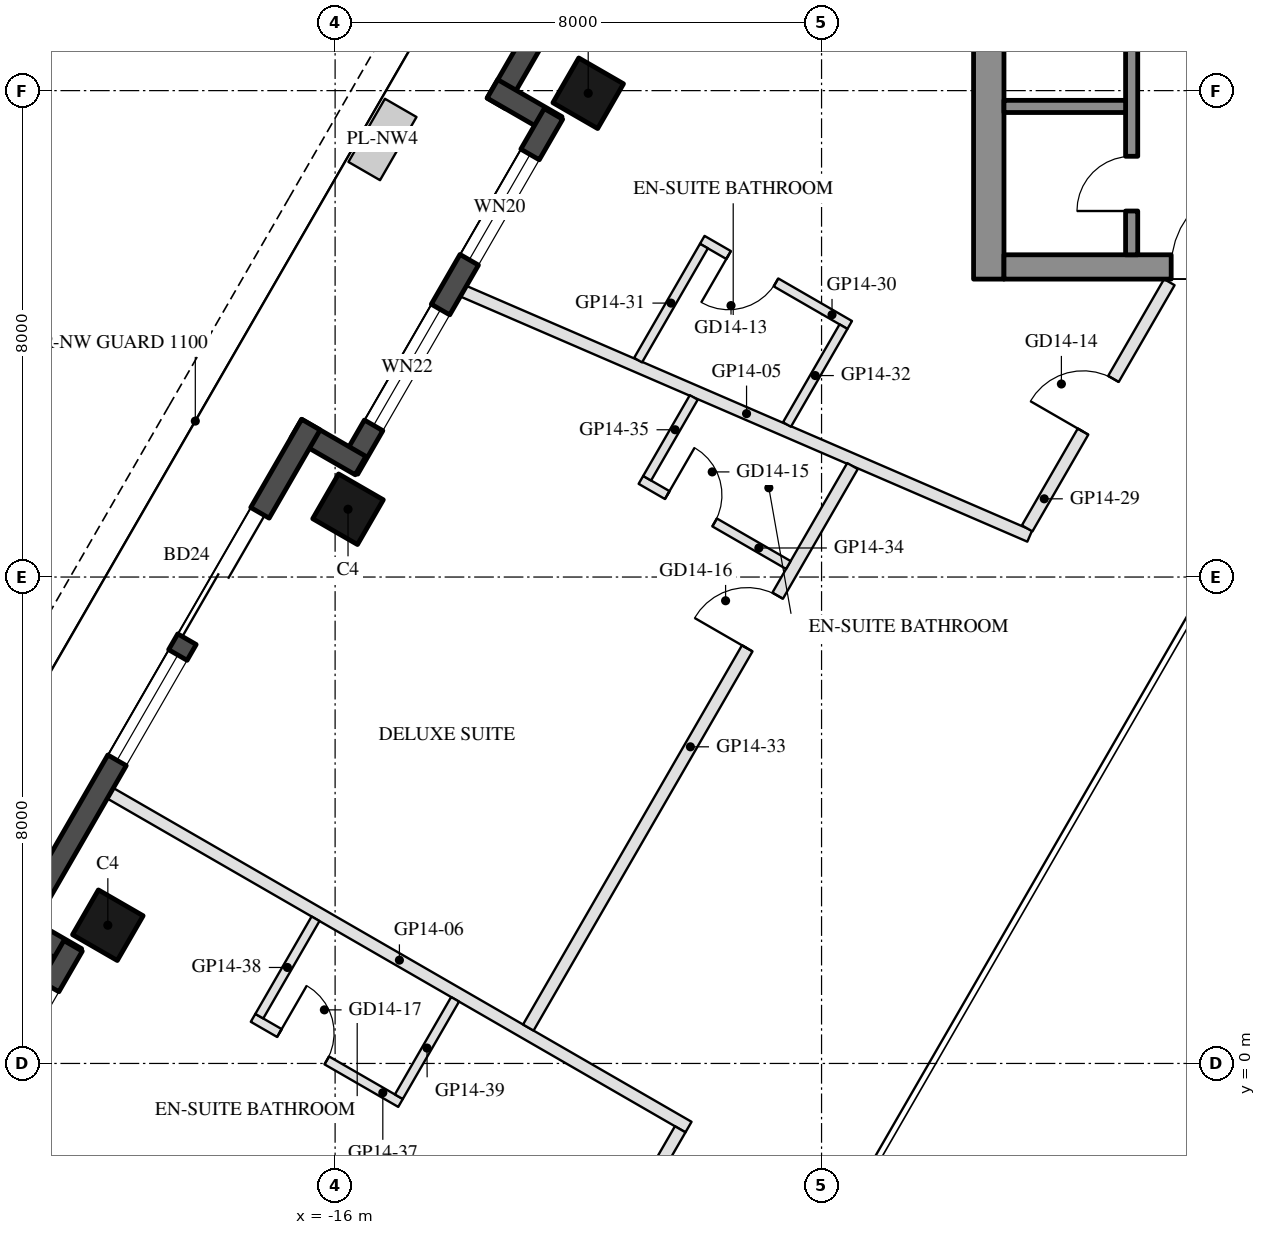
"""IFC4 building model, lengths in metres.
Left out: names, types, materials, properties, quantities, classifications, styles, units other than length and angle.
Written with IfcOpenShell. Run it as: python <this file> out.ifc"""

import sys

from ifc_helpers import new_model, si_unit, direction, frame, frame_2d, origin, origin_2d, place, context, subcontext, project, spatial, rectangle, hollow_rectangle, extrude, element, fill, save


model = new_model("IFC4")
c1 = context("Model", 3, precision=1e-05, world=origin(), true_north=direction((0.0, 1.0)))
c2 = subcontext(c1, "Body", "Model", "MODEL_VIEW")
j1 = project(units=[si_unit("LENGTHUNIT", "METRE"), si_unit("PLANEANGLEUNIT", "RADIAN")], contexts=[c1])
p1 = place(None, origin())
s1 = spatial("IfcSite", under=j1, at=p1, CompositionType="ELEMENT")
p2 = place(p1, origin())
s2 = spatial("IfcBuilding", under=s1, at=p2, CompositionType="ELEMENT")
p3 = place(p2, frame((0.0, 0.0, 161.4)))
s3 = spatial("IfcBuildingStorey", under=s2, at=p3, CompositionType="ELEMENT", Elevation=161.4)
for number, where, z_axis, x_axis in (
    (1, (-11.838, 15.957, 0.0), (0.0, 0.0, 1.0), (0.5, 0.866, 0.0)),
    (2, (-15.788, 9.115, 0.0), (0.0, 0.0, 1.0), (0.5, 0.866, 0.0)),
    (3, (-19.738, 2.273, 0.0), (0.0, 0.0, 1.0), (0.5, 0.866, 0.0)),
):
    element("IfcColumn", number, at=place(p3, frame(where, z_axis=z_axis, x_axis=x_axis)), inside=s3, PredefinedType="COLUMN", context=c2, shape_type="SweptSolid", body=[
        extrude(hollow_rectangle(XDim=0.85, YDim=0.85, WallThickness=0.04, at=origin_2d()), origin(), (0.0, 0.0, 1.0), 3.7),
    ])
p4 = place(p3, frame((-7.441, 26.022, 0.0), z_axis=(0.0, 0.0, 1.0), x_axis=(-0.499992533062, -0.86602971478, 0.0)))
e4 = element("IfcWall", 4, at=p4, inside=s3, PredefinedType="SOLIDWALL", context=c2, shape_type="SweptSolid", body=[
    extrude(rectangle(XDim=11.816, YDim=0.35, at=frame_2d((5.908, 0.0))), origin(), (0.0, 0.0, 1.0), 3.55),
])
p5 = place(p4, frame((0.381, 0.0, 0.3)))
e5 = element("IfcOpeningElement", 5, at=p5, cuts=e4, PredefinedType="OPENING", context=c2, shape_type="SweptSolid", body=[
    extrude(rectangle(XDim=1.8, YDim=2.65, at=frame_2d((0.9, 1.325))), frame((0.0, 0.185, 0.0), z_axis=(0.0, -1.0, 0.0), x_axis=(1.0, 0.0, 0.0)), (0.0, 0.0, 1.0), 0.37),
])
p6 = place(p4, frame((7.74, 0.0, 0.0)))
e6 = element("IfcOpeningElement", 6, at=p6, cuts=e4, PredefinedType="OPENING", context=c2, shape_type="SweptSolid", body=[
    extrude(rectangle(XDim=2.4, YDim=2.4, at=frame_2d((1.2, 1.2))), frame((0.0, 0.185, 0.0), z_axis=(0.0, -1.0, 0.0), x_axis=(1.0, 0.0, 0.0)), (0.0, 0.0, 1.0), 0.37),
])
p7 = place(p4, frame((3.791, 0.0, 0.3)))
e7 = element("IfcOpeningElement", 7, at=p7, cuts=e4, PredefinedType="OPENING", context=c2, shape_type="SweptSolid", body=[
    extrude(rectangle(XDim=1.6, YDim=2.65, at=frame_2d((0.8, 1.325))), frame((0.0, 0.185, 0.0), z_axis=(0.0, -1.0, 0.0), x_axis=(1.0, 0.0, 0.0)), (0.0, 0.0, 1.0), 0.37),
])
p8 = place(p4, frame((5.691, 0.0, 0.3)))
e8 = element("IfcOpeningElement", 8, at=p8, cuts=e4, PredefinedType="OPENING", context=c2, shape_type="SweptSolid", body=[
    extrude(rectangle(XDim=1.6, YDim=2.65, at=frame_2d((0.8, 1.325))), frame((0.0, 0.185, 0.0), z_axis=(0.0, -1.0, 0.0), x_axis=(1.0, 0.0, 0.0)), (0.0, 0.0, 1.0), 0.37),
])
p9 = place(p3, frame((-13.413, 16.029, 0.0), z_axis=(0.0, 0.0, 1.0), x_axis=(0.866005645448, -0.500034220881, 0.0)))
e9 = element("IfcWall", 9, at=p9, inside=s3, PredefinedType="SOLIDWALL", context=c2, shape_type="SweptSolid", body=[
    extrude(rectangle(XDim=1.22, YDim=0.35, at=frame_2d((0.61, 0.0))), origin(), (0.0, 0.0, 1.0), 3.55),
])
p10 = place(p3, frame((-12.409, 15.617, 0.0), z_axis=(0.0, 0.0, 1.0), x_axis=(-0.500003597184, -0.866023326939, 0.0)))
e10 = element("IfcWall", 10, at=p10, inside=s3, PredefinedType="SOLIDWALL", context=c2, shape_type="SweptSolid", body=[
    extrude(rectangle(XDim=6.74, YDim=0.35, at=frame_2d((3.37, 0.0))), origin(), (0.0, 0.0, 1.0), 3.55),
])
p11 = place(p10, frame((0.77, 0.0, 0.3)))
e11 = element("IfcOpeningElement", 11, at=p11, cuts=e10, PredefinedType="OPENING", context=c2, shape_type="SweptSolid", body=[
    extrude(rectangle(XDim=2.0, YDim=2.65, at=frame_2d((1.0, 1.325))), frame((0.0, 0.185, 0.0), z_axis=(0.0, -1.0, 0.0), x_axis=(1.0, 0.0, 0.0)), (0.0, 0.0, 1.0), 0.37),
])
p12 = place(p10, frame((3.715, 0.0, 0.3)))
e12 = element("IfcOpeningElement", 12, at=p12, cuts=e10, PredefinedType="OPENING", context=c2, shape_type="SweptSolid", body=[
    extrude(rectangle(XDim=2.2, YDim=2.65, at=frame_2d((1.1, 1.325))), frame((0.0, 0.185, 0.0), z_axis=(0.0, -1.0, 0.0), x_axis=(1.0, 0.0, 0.0)), (0.0, 0.0, 1.0), 0.37),
])
p13 = place(p3, frame((-15.581, 9.833, 0.0), z_axis=(0.0, 0.0, 1.0), x_axis=(-0.866055662726, 0.499947586314, 0.0)))
e13 = element("IfcWall", 13, at=p13, inside=s3, PredefinedType="SOLIDWALL", context=c2, shape_type="SweptSolid", body=[
    extrude(rectangle(XDim=1.22, YDim=0.35, at=frame_2d((0.61, 0.0))), origin(), (0.0, 0.0, 1.0), 3.55),
])
p14 = place(p3, frame((-16.398, 10.507, 0.0), z_axis=(0.0, 0.0, 1.0), x_axis=(-0.499999142773, -0.866025898704, 0.0)))
e14 = element("IfcWall", 14, at=p14, inside=s3, PredefinedType="SOLIDWALL", context=c2, shape_type="SweptSolid", body=[
    extrude(rectangle(XDim=9.7, YDim=0.35, at=frame_2d((4.85, 0.0))), origin(), (0.0, 0.0, 1.0), 3.55),
])
p15 = place(p14, frame((1.675, 0.0, 0.0)))
e15 = element("IfcOpeningElement", 15, at=p15, cuts=e14, PredefinedType="OPENING", context=c2, shape_type="SweptSolid", body=[
    extrude(rectangle(XDim=2.4, YDim=2.4, at=frame_2d((1.2, 1.2))), frame((0.0, 0.185, 0.0), z_axis=(0.0, -1.0, 0.0), x_axis=(1.0, 0.0, 0.0)), (0.0, 0.0, 1.0), 0.37),
])
p16 = place(p14, frame((4.375, 0.0, 0.3)))
e16 = element("IfcOpeningElement", 16, at=p16, cuts=e14, PredefinedType="OPENING", context=c2, shape_type="SweptSolid", body=[
    extrude(rectangle(XDim=2.0, YDim=2.65, at=frame_2d((1.0, 1.325))), frame((0.0, 0.185, 0.0), z_axis=(0.0, -1.0, 0.0), x_axis=(1.0, 0.0, 0.0)), (0.0, 0.0, 1.0), 0.37),
])
p17 = place(p3, frame((-21.312, 2.346, 0.0), z_axis=(0.0, 0.0, 1.0), x_axis=(0.866005645448, -0.500034220881, 0.0)))
e17 = element("IfcWall", 17, at=p17, inside=s3, PredefinedType="SOLIDWALL", context=c2, shape_type="SweptSolid", body=[
    extrude(rectangle(XDim=1.22, YDim=0.35, at=frame_2d((0.61, 0.0))), origin(), (0.0, 0.0, 1.0), 3.55),
])
p18 = place(p3, frame((-20.309, 1.934, 0.0), z_axis=(0.0, 0.0, 1.0), x_axis=(-0.499992114976, -0.866029956157, 0.0)))
e18 = element("IfcWall", 18, at=p18, inside=s3, PredefinedType="SOLIDWALL", context=c2, shape_type="SweptSolid", body=[
    extrude(rectangle(XDim=6.74, YDim=0.35, at=frame_2d((3.37, 0.0))), origin(), (0.0, 0.0, 1.0), 3.55),
])
p19 = place(p18, frame((4.02, 0.0, 0.0)))
e19 = element("IfcOpeningElement", 19, at=p19, cuts=e18, PredefinedType="OPENING", context=c2, shape_type="SweptSolid", body=[
    extrude(rectangle(XDim=2.4, YDim=2.4, at=frame_2d((1.2, 1.2))), frame((0.0, 0.185, 0.0), z_axis=(0.0, -1.0, 0.0), x_axis=(1.0, 0.0, 0.0)), (0.0, 0.0, 1.0), 0.37),
])
p20 = place(p18, frame((0.77, 0.0, 0.3)))
e20 = element("IfcOpeningElement", 20, at=p20, cuts=e18, PredefinedType="OPENING", context=c2, shape_type="SweptSolid", body=[
    extrude(rectangle(XDim=2.9, YDim=2.65, at=frame_2d((1.45, 1.325))), frame((0.0, 0.185, 0.0), z_axis=(0.0, -1.0, 0.0), x_axis=(1.0, 0.0, 0.0)), (0.0, 0.0, 1.0), 0.37),
])
p21 = place(p3, frame((-5.25, 12.9, 0.0), z_axis=(0.0, 0.0, 1.0), x_axis=(0.0, 1.0, 0.0)))
e21 = element("IfcWall", 21, at=p21, inside=s3, PredefinedType="SHEAR", context=c2, shape_type="SweptSolid", body=[
    extrude(rectangle(XDim=14.837, YDim=0.5, at=frame_2d((7.418, 0.0))), origin(), (0.0, 0.0, 1.0), 3.5),
])
p22 = place(p3, frame((5.0, 13.1, 0.0), z_axis=(0.0, 0.0, 1.0), x_axis=(-1.0, 0.0, 0.0)))
e22 = element("IfcWall", 22, at=p22, inside=s3, PredefinedType="SHEAR", context=c2, shape_type="SweptSolid", body=[
    extrude(rectangle(XDim=10.0, YDim=0.4, at=frame_2d((5.0, 0.0))), origin(), (0.0, 0.0, 1.0), 3.5),
])
p23 = place(p22, frame((3.55, 0.0, 0.0)))
e23 = element("IfcOpeningElement", 23, at=p23, cuts=e22, PredefinedType="OPENING", context=c2, shape_type="SweptSolid", body=[
    extrude(rectangle(XDim=1.1, YDim=2.1, at=frame_2d((0.55, 1.05))), frame((0.0, 0.21, 0.0), z_axis=(0.0, -1.0, 0.0), x_axis=(1.0, 0.0, 0.0)), (0.0, 0.0, 1.0), 0.42),
])
p24 = place(p22, frame((5.85, 0.0, 0.0)))
e24 = element("IfcOpeningElement", 24, at=p24, cuts=e22, PredefinedType="OPENING", context=c2, shape_type="SweptSolid", body=[
    extrude(rectangle(XDim=1.4, YDim=2.1, at=frame_2d((0.7, 1.05))), frame((0.0, 0.21, 0.0), z_axis=(0.0, -1.0, 0.0), x_axis=(1.0, 0.0, 0.0)), (0.0, 0.0, 1.0), 0.42),
])
p25 = place(p3, frame((-2.9, 13.3, 0.0), z_axis=(0.0, 0.0, 1.0), x_axis=(0.0, 1.0, 0.0)))
e25 = element("IfcWall", 25, at=p25, inside=s3, PredefinedType="SHEAR", context=c2, shape_type="SweptSolid", body=[
    extrude(rectangle(XDim=12.6, YDim=0.2, at=frame_2d((6.3, 0.0))), origin(), (0.0, 0.0, 1.0), 3.5),
])
p26 = place(p25, frame((0.72, 0.0, 0.0)))
e26 = element("IfcOpeningElement", 26, at=p26, cuts=e25, PredefinedType="OPENING", context=c2, shape_type="SweptSolid", body=[
    extrude(rectangle(XDim=0.9, YDim=2.1, at=frame_2d((0.45, 1.05))), frame((0.0, 0.11, 0.0), z_axis=(0.0, -1.0, 0.0), x_axis=(1.0, 0.0, 0.0)), (0.0, 0.0, 1.0), 0.22),
])
p27 = place(p25, frame((5.8, 0.0, 0.0)))
e27 = element("IfcOpeningElement", 27, at=p27, cuts=e25, PredefinedType="OPENING", context=c2, shape_type="SweptSolid", body=[
    extrude(rectangle(XDim=0.9, YDim=2.1, at=frame_2d((0.45, 1.05))), frame((0.0, 0.11, 0.0), z_axis=(0.0, -1.0, 0.0), x_axis=(1.0, 0.0, 0.0)), (0.0, 0.0, 1.0), 0.22),
])
p28 = place(p25, frame((10.51, 0.0, 0.0)))
e28 = element("IfcOpeningElement", 28, at=p28, cuts=e25, PredefinedType="OPENING", context=c2, shape_type="SweptSolid", body=[
    extrude(rectangle(XDim=0.9, YDim=2.1, at=frame_2d((0.45, 1.05))), frame((0.0, 0.11, 0.0), z_axis=(0.0, -1.0, 0.0), x_axis=(1.0, 0.0, 0.0)), (0.0, 0.0, 1.0), 0.22),
])
p29 = place(p3, frame((-3.0, 15.74, 0.0), z_axis=(0.0, 0.0, 1.0), x_axis=(-1.0, 0.0, 0.0)))
e29 = element("IfcWall", 29, at=p29, inside=s3, PredefinedType="SHEAR", context=c2, shape_type="SweptSolid", body=[
    extrude(rectangle(XDim=2.0, YDim=0.2, at=frame_2d((1.0, 0.0))), origin(), (0.0, 0.0, 1.0), 3.5),
])
p30 = place(p3, frame((-13.89, 12.701, 0.0), z_axis=(0.0, 0.0, 1.0), x_axis=(0.917850876745, -0.396925393566, 0.0)))
e30 = element("IfcWall", 30, at=p30, inside=s3, PredefinedType="PARTITIONING", context=c2, shape_type="SweptSolid", body=[
    extrude(rectangle(XDim=10.147, YDim=0.2, at=frame_2d((5.074, 0.0))), origin(), (0.0, 0.0, 1.0), 2.95),
])
p31 = place(p3, frame((-19.697, 4.444, 0.0), z_axis=(0.0, 0.0, 1.0), x_axis=(0.866027479907, -0.499996404033, 0.0)))
e31 = element("IfcWall", 31, at=p31, inside=s3, PredefinedType="PARTITIONING", context=c2, shape_type="SweptSolid", body=[
    extrude(rectangle(XDim=10.98, YDim=0.2, at=frame_2d((5.49, 0.0))), origin(), (0.0, 0.0, 1.0), 3.06),
])
p32 = place(p3, frame((-4.618, 8.801, 0.0), z_axis=(0.0, 0.0, 1.0), x_axis=(0.499980071345, 0.866036909293, 0.0)))
e32 = element("IfcWall", 32, at=p32, inside=s3, PredefinedType="PARTITIONING", context=c2, shape_type="SweptSolid", body=[
    extrude(rectangle(XDim=4.676, YDim=0.2, at=frame_2d((2.338, 0.0))), origin(), (0.0, 0.0, 1.0), 2.95),
])
p33 = place(p32, frame((1.838, 0.0, 0.0)))
e33 = element("IfcOpeningElement", 33, at=p33, cuts=e32, PredefinedType="OPENING", context=c2, shape_type="SweptSolid", body=[
    extrude(rectangle(XDim=1.0, YDim=2.1, at=frame_2d((0.5, 1.05))), frame((0.0, 0.11, 0.0), z_axis=(0.0, -1.0, 0.0), x_axis=(1.0, 0.0, 0.0)), (0.0, 0.0, 1.0), 0.22),
])
p34 = place(p3, frame((-7.537, 12.146, 0.0), z_axis=(0.0, 0.0, 1.0), x_axis=(-0.866034573852, 0.49998411664, 0.0)))
e34 = element("IfcWall", 34, at=p34, inside=s3, PredefinedType="PARTITIONING", context=c2, shape_type="SweptSolid", body=[
    extrude(rectangle(XDim=2.8, YDim=0.15, at=frame_2d((1.4, 0.0))), origin(), (0.0, 0.0, 1.0), 3.55),
])
p35 = place(p34, frame((1.4, 0.0, 0.0)))
e35 = element("IfcOpeningElement", 35, at=p35, cuts=e34, PredefinedType="OPENING", context=c2, shape_type="SweptSolid", body=[
    extrude(rectangle(XDim=0.9, YDim=2.1, at=frame_2d((0.45, 1.05))), frame((0.0, 0.085, 0.0), z_axis=(0.0, -1.0, 0.0), x_axis=(1.0, 0.0, 0.0)), (0.0, 0.0, 1.0), 0.17),
])
p36 = place(p3, frame((-9.934, 13.443, 0.0), z_axis=(0.0, 0.0, 1.0), x_axis=(-0.500018419339, -0.866014769113, 0.0)))
e36 = element("IfcWall", 36, at=p36, inside=s3, PredefinedType="PARTITIONING", context=c2, shape_type="SweptSolid", body=[
    extrude(rectangle(XDim=2.166, YDim=0.15, at=frame_2d((1.083, 0.0))), origin(), (0.0, 0.0, 1.0), 3.55),
])
p37 = place(p3, frame((-7.639, 12.118, 0.0), z_axis=(0.0, 0.0, 1.0), x_axis=(-0.500052179009, -0.865995276124, 0.0)))
e37 = element("IfcWall", 37, at=p37, inside=s3, PredefinedType="PARTITIONING", context=c2, shape_type="SweptSolid", body=[
    extrude(rectangle(XDim=1.859, YDim=0.15, at=frame_2d((0.929, 0.0))), origin(), (0.0, 0.0, 1.0), 3.55),
])
p38 = place(p3, frame((-12.823, 0.591, 0.0), z_axis=(0.0, 0.0, 1.0), x_axis=(0.500005210312, 0.866022395588, 0.0)))
e38 = element("IfcWall", 38, at=p38, inside=s3, PredefinedType="PARTITIONING", context=c2, shape_type="SweptSolid", body=[
    extrude(rectangle(XDim=10.663, YDim=0.2, at=frame_2d((5.332, 0.0))), origin(), (0.0, 0.0, 1.0), 2.95),
])
p39 = place(p38, frame((7.201, 0.0, 0.0)))
e39 = element("IfcOpeningElement", 39, at=p39, cuts=e38, PredefinedType="OPENING", context=c2, shape_type="SweptSolid", body=[
    extrude(rectangle(XDim=1.0, YDim=2.1, at=frame_2d((0.5, 1.05))), frame((0.0, 0.11, 0.0), z_axis=(0.0, -1.0, 0.0), x_axis=(1.0, 0.0, 0.0)), (0.0, 0.0, 1.0), 0.22),
])
p40 = place(p3, frame((-10.971, 9.598, 0.0), z_axis=(0.0, 0.0, 1.0), x_axis=(0.865996816683, -0.500049511043, 0.0)))
e40 = element("IfcWall", 40, at=p40, inside=s3, PredefinedType="PARTITIONING", context=c2, shape_type="SweptSolid", body=[
    extrude(rectangle(XDim=2.8, YDim=0.15, at=frame_2d((1.4, 0.0))), origin(), (0.0, 0.0, 1.0), 3.55),
])
p41 = place(p40, frame((0.5, 0.0, 0.0)))
e41 = element("IfcOpeningElement", 41, at=p41, cuts=e40, PredefinedType="OPENING", context=c2, shape_type="SweptSolid", body=[
    extrude(rectangle(XDim=0.9, YDim=2.1, at=frame_2d((0.45, 1.05))), frame((0.0, 0.085, 0.0), z_axis=(0.0, -1.0, 0.0), x_axis=(1.0, 0.0, 0.0)), (0.0, 0.0, 1.0), 0.17),
])
p42 = place(p3, frame((-10.102, 10.954, 0.0), z_axis=(0.0, 0.0, 1.0), x_axis=(-0.499956687145, -0.866050409029, 0.0)))
e42 = element("IfcWall", 42, at=p42, inside=s3, PredefinedType="PARTITIONING", context=c2, shape_type="SweptSolid", body=[
    extrude(rectangle(XDim=1.534, YDim=0.15, at=frame_2d((0.767, 0.0))), origin(), (0.0, 0.0, 1.0), 2.95),
])
p43 = place(p3, frame((-12.269, -4.45, 0.0), z_axis=(0.0, 0.0, 1.0), x_axis=(0.500008716408, 0.866020371305, 0.0)))
e43 = element("IfcWall", 43, at=p43, inside=s3, PredefinedType="PARTITIONING", context=c2, shape_type="SweptSolid", body=[
    extrude(rectangle(XDim=3.888, YDim=0.2, at=frame_2d((1.944, 0.0))), origin(), (0.0, 0.0, 1.0), 2.95),
])
p44 = place(p43, frame((1.444, 0.0, 0.0)))
e44 = element("IfcOpeningElement", 44, at=p44, cuts=e43, PredefinedType="OPENING", context=c2, shape_type="SweptSolid", body=[
    extrude(rectangle(XDim=1.0, YDim=2.1, at=frame_2d((0.5, 1.05))), frame((0.0, 0.11, 0.0), z_axis=(0.0, -1.0, 0.0), x_axis=(1.0, 0.0, 0.0)), (0.0, 0.0, 1.0), 0.22),
])
p45 = place(p3, frame((-17.349, 0.75, 0.0), z_axis=(0.0, 0.0, 1.0), x_axis=(0.866056369097, -0.49994636267, 0.0)))
e45 = element("IfcWall", 45, at=p45, inside=s3, PredefinedType="PARTITIONING", context=c2, shape_type="SweptSolid", body=[
    extrude(rectangle(XDim=2.8, YDim=0.15, at=frame_2d((1.4, 0.0))), origin(), (0.0, 0.0, 1.0), 2.95),
])
p46 = place(p45, frame((0.5, 0.0, 0.0)))
e46 = element("IfcOpeningElement", 46, at=p46, cuts=e45, PredefinedType="OPENING", context=c2, shape_type="SweptSolid", body=[
    extrude(rectangle(XDim=0.9, YDim=2.1, at=frame_2d((0.45, 1.05))), frame((0.0, 0.085, 0.0), z_axis=(0.0, -1.0, 0.0), x_axis=(1.0, 0.0, 0.0)), (0.0, 0.0, 1.0), 0.17),
])
for number, where, z_axis, x_axis in (
    (47, (-16.322, 2.38, 0.0), (0.0, 0.0, 1.0), (-0.5, -0.866, 0.0)),
    (48, (-14.027, 1.055, 0.0), (0.0, 0.0, 1.0), (-0.5, -0.866, 0.0)),
):
    element("IfcWall", number, at=place(p3, frame(where, z_axis=z_axis, x_axis=x_axis)), inside=s3, PredefinedType="PARTITIONING", context=c2, shape_type="SweptSolid", body=[
        extrude(rectangle(XDim=1.85, YDim=0.15, at=frame_2d((0.925, 0.0))), origin(), (0.0, 0.0, 1.0), 2.95),
    ])
p47 = place(p11, origin())
e49 = element("IfcWindow", 49, at=p47, inside=s3, PartitioningType="SINGLE_PANEL", PredefinedType="WINDOW", context=c2, shape_type="SweptSolid", body=[
    extrude(rectangle(XDim=2.0, YDim=2.65, at=frame_2d((1.0, 1.325))), frame((0.0, 0.03, 0.0), z_axis=(0.0, -1.0, 0.0), x_axis=(1.0, 0.0, 0.0)), (0.0, 0.0, 1.0), 0.06),
])
fill(e11, e49)
p48 = place(p12, origin())
e50 = element("IfcWindow", 50, at=p48, inside=s3, PartitioningType="SINGLE_PANEL", PredefinedType="WINDOW", context=c2, shape_type="SweptSolid", body=[
    extrude(rectangle(XDim=2.2, YDim=2.65, at=frame_2d((1.1, 1.325))), frame((0.0, 0.03, 0.0), z_axis=(0.0, -1.0, 0.0), x_axis=(1.0, 0.0, 0.0)), (0.0, 0.0, 1.0), 0.06),
])
fill(e12, e50)
p49 = place(p15, frame((2.4, 0.0, 0.0), z_axis=(0.0, 0.0, 1.0), x_axis=(-1.0, 0.0, 0.0)))
e51 = element("IfcDoor", 51, at=p49, inside=s3, OperationType="SLIDING_TO_LEFT", PredefinedType="DOOR", context=c2, shape_type="SweptSolid", body=[
    extrude(rectangle(XDim=2.4, YDim=2.4, at=frame_2d((1.2, 1.2))), frame((0.0, 0.025, 0.0), z_axis=(0.0, -1.0, 0.0), x_axis=(1.0, 0.0, 0.0)), (0.0, 0.0, 1.0), 0.05),
])
fill(e15, e51)
p50 = place(p16, origin())
e52 = element("IfcWindow", 52, at=p50, inside=s3, PartitioningType="SINGLE_PANEL", PredefinedType="WINDOW", context=c2, shape_type="SweptSolid", body=[
    extrude(rectangle(XDim=2.0, YDim=2.65, at=frame_2d((1.0, 1.325))), frame((0.0, 0.03, 0.0), z_axis=(0.0, -1.0, 0.0), x_axis=(1.0, 0.0, 0.0)), (0.0, 0.0, 1.0), 0.06),
])
fill(e16, e52)
p51 = place(p26, origin())
e53 = element("IfcDoor", 53, at=p51, inside=s3, OperationType="SINGLE_SWING_LEFT", PredefinedType="DOOR", context=c2, shape_type="SweptSolid", body=[
    extrude(rectangle(XDim=0.9, YDim=2.1, at=frame_2d((0.45, 1.05))), frame((0.0, 0.025, 0.0), z_axis=(0.0, -1.0, 0.0), x_axis=(1.0, 0.0, 0.0)), (0.0, 0.0, 1.0), 0.05),
])
fill(e26, e53)
p52 = place(p24, frame((1.4, 0.0, 0.0), z_axis=(0.0, 0.0, 1.0), x_axis=(-1.0, 0.0, 0.0)))
e54 = element("IfcDoor", 54, at=p52, inside=s3, OperationType="DOUBLE_DOOR_SINGLE_SWING", PredefinedType="DOOR", context=c2, shape_type="SweptSolid", body=[
    extrude(rectangle(XDim=1.4, YDim=2.1, at=frame_2d((0.7, 1.05))), frame((0.0, 0.025, 0.0), z_axis=(0.0, -1.0, 0.0), x_axis=(1.0, 0.0, 0.0)), (0.0, 0.0, 1.0), 0.05),
])
fill(e24, e54)
p53 = place(p35, origin())
e55 = element("IfcDoor", 55, at=p53, inside=s3, OperationType="SINGLE_SWING_RIGHT", PredefinedType="DOOR", context=c2, shape_type="SweptSolid", body=[
    extrude(rectangle(XDim=0.9, YDim=2.1, at=frame_2d((0.45, 1.05))), frame((0.0, 0.025, 0.0), z_axis=(0.0, -1.0, 0.0), x_axis=(1.0, 0.0, 0.0)), (0.0, 0.0, 1.0), 0.05),
])
fill(e35, e55)
p54 = place(p33, origin())
e56 = element("IfcDoor", 56, at=p54, inside=s3, OperationType="SINGLE_SWING_LEFT", PredefinedType="DOOR", context=c2, shape_type="SweptSolid", body=[
    extrude(rectangle(XDim=1.0, YDim=2.1, at=frame_2d((0.5, 1.05))), frame((0.0, 0.025, 0.0), z_axis=(0.0, -1.0, 0.0), x_axis=(1.0, 0.0, 0.0)), (0.0, 0.0, 1.0), 0.05),
])
fill(e33, e56)
p55 = place(p41, origin())
e57 = element("IfcDoor", 57, at=p55, inside=s3, OperationType="SINGLE_SWING_LEFT", PredefinedType="DOOR", context=c2, shape_type="SweptSolid", body=[
    extrude(rectangle(XDim=0.9, YDim=2.1, at=frame_2d((0.45, 1.05))), frame((0.0, 0.025, 0.0), z_axis=(0.0, -1.0, 0.0), x_axis=(1.0, 0.0, 0.0)), (0.0, 0.0, 1.0), 0.05),
])
fill(e41, e57)
p56 = place(p39, origin())
e58 = element("IfcDoor", 58, at=p56, inside=s3, OperationType="SINGLE_SWING_LEFT", PredefinedType="DOOR", context=c2, shape_type="SweptSolid", body=[
    extrude(rectangle(XDim=1.0, YDim=2.1, at=frame_2d((0.5, 1.05))), frame((0.0, 0.025, 0.0), z_axis=(0.0, -1.0, 0.0), x_axis=(1.0, 0.0, 0.0)), (0.0, 0.0, 1.0), 0.05),
])
fill(e39, e58)
p57 = place(p46, origin())
e59 = element("IfcDoor", 59, at=p57, inside=s3, OperationType="SINGLE_SWING_LEFT", PredefinedType="DOOR", context=c2, shape_type="SweptSolid", body=[
    extrude(rectangle(XDim=0.9, YDim=2.1, at=frame_2d((0.45, 1.05))), frame((0.0, 0.025, 0.0), z_axis=(0.0, -1.0, 0.0), x_axis=(1.0, 0.0, 0.0)), (0.0, 0.0, 1.0), 0.05),
])
fill(e46, e59)
save(model, sys.argv[1])
